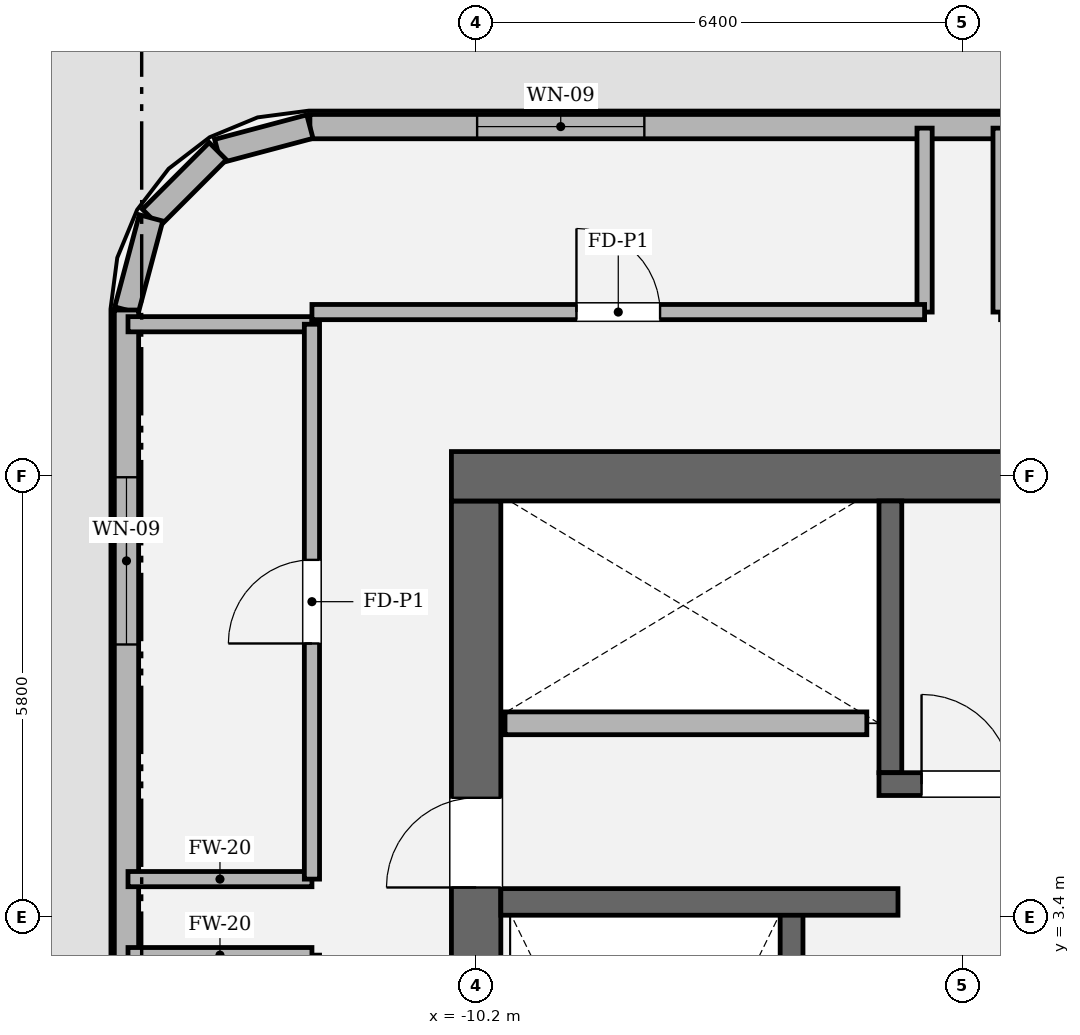
"""IFC4 building model, lengths in metres.
Left out: names, types, materials, properties, quantities, classifications, styles, units other than length and angle.
Written with IfcOpenShell. Run it as: python <this file> out.ifc"""

import sys

from ifc_helpers import new_model, si_unit, direction, frame, frame_2d, origin, place, context, subcontext, project, spatial, rectangle, extrude, element, fill, save


model = new_model("IFC4")
c1 = context("Model", 3, precision=1e-05, world=origin(), true_north=direction((0.0, 1.0)))
c2 = subcontext(c1, "Body", "Model", "MODEL_VIEW")
j1 = project(units=[si_unit("LENGTHUNIT", "METRE"), si_unit("PLANEANGLEUNIT", "RADIAN")], contexts=[c1])
p1 = place(None, origin())
s1 = spatial("IfcSite", under=j1, at=p1, CompositionType="ELEMENT")
p2 = place(p1, origin())
s2 = spatial("IfcBuilding", under=s1, at=p2, CompositionType="ELEMENT")
p3 = place(p2, frame((0.0, 0.0, 125.4)))
s3 = spatial("IfcBuildingStorey", under=s2, at=p3, CompositionType="ELEMENT", Elevation=125.4)
p4 = place(p3, frame((-10.2, -8.875, 0.0), z_axis=(0.0, 0.0, 1.0), x_axis=(0.0, 1.0, 0.0)))
e1 = element("IfcWall", 1, at=p4, inside=s3, PredefinedType="SHEAR", context=c2, shape_type="SweptSolid", body=[
    extrude(rectangle(XDim=17.75, YDim=0.65, at=frame_2d((8.875, 0.0))), origin(), (0.0, 0.0, 1.0), 4.8),
])
p5 = place(p4, frame((12.665, 0.0, 0.0)))
e2 = element("IfcOpeningElement", 2, at=p5, cuts=e1, PredefinedType="OPENING", context=c2, shape_type="SweptSolid", body=[
    extrude(rectangle(XDim=1.18, YDim=2.2, at=frame_2d((0.59, 1.1))), frame((0.0, 0.335, 0.0), z_axis=(0.0, -1.0, 0.0), x_axis=(1.0, 0.0, 0.0)), (0.0, 0.0, 1.0), 0.67),
])
p6 = place(p3, frame((-10.525, 9.2, 0.0), z_axis=(0.0, 0.0, 1.0), x_axis=(1.0, 0.0, 0.0)))
e3 = element("IfcWall", 3, at=p6, inside=s3, PredefinedType="SHEAR", context=c2, shape_type="SweptSolid", body=[
    extrude(rectangle(XDim=21.05, YDim=0.65, at=frame_2d((10.525, 0.0))), origin(), (0.0, 0.0, 1.0), 4.8),
])
p7 = place(p3, frame((-6.05, -5.5, 0.0), z_axis=(0.0, 0.0, 1.0), x_axis=(0.0, 1.0, 0.0)))
e4 = element("IfcWall", 4, at=p7, inside=s3, PredefinedType="SOLIDWALL", context=c2, shape_type="SweptSolid", body=[
    extrude(rectangle(XDim=8.95, YDim=0.3, at=frame_2d((4.475, 0.0))), origin(), (0.0, 0.0, 1.0), 4.8),
])
p8 = place(p3, frame((-4.75, 5.3, 0.0), z_axis=(0.0, 0.0, 1.0), x_axis=(0.0, 1.0, 0.0)))
e5 = element("IfcWall", 5, at=p8, inside=s3, PredefinedType="SOLIDWALL", context=c2, shape_type="SweptSolid", body=[
    extrude(rectangle(XDim=3.575, YDim=0.3, at=frame_2d((1.788, 0.0))), origin(), (0.0, 0.0, 1.0), 4.8),
])
p9 = place(p3, frame((-4.9, 5.15, 0.0), z_axis=(0.0, 0.0, 1.0), x_axis=(1.0, 0.0, 0.0)))
e6 = element("IfcWall", 6, at=p9, inside=s3, PredefinedType="SOLIDWALL", context=c2, shape_type="SweptSolid", body=[
    extrude(rectangle(XDim=9.8, YDim=0.3, at=frame_2d((4.9, 0.0))), origin(), (0.0, 0.0, 1.0), 4.8),
])
p10 = place(p9, frame((0.56, 0.0, 0.0)))
e7 = element("IfcOpeningElement", 7, at=p10, cuts=e6, PredefinedType="OPENING", context=c2, shape_type="SweptSolid", body=[
    extrude(rectangle(XDim=1.18, YDim=2.2, at=frame_2d((0.59, 1.1))), frame((0.0, 0.16, 0.0), z_axis=(0.0, -1.0, 0.0), x_axis=(1.0, 0.0, 0.0)), (0.0, 0.0, 1.0), 0.32),
])
p11 = place(p3, frame((-9.875, 3.6, 0.0), z_axis=(0.0, 0.0, 1.0), x_axis=(1.0, 0.0, 0.0)))
e8 = element("IfcWall", 8, at=p11, inside=s3, PredefinedType="SOLIDWALL", context=c2, shape_type="SweptSolid", body=[
    extrude(rectangle(XDim=5.225, YDim=0.35, at=frame_2d((2.613, 0.0))), origin(), (0.0, 0.0, 1.0), 4.8),
])
p12 = place(p3, frame((12.387, 13.8, 0.0), z_axis=(0.0, 0.0, 1.0), x_axis=(-1.0, 0.0, 0.0)))
e9 = element("IfcWall", 9, at=p12, inside=s3, PredefinedType="SOLIDWALL", context=c2, shape_type="SweptSolid", body=[
    extrude(rectangle(XDim=24.774, YDim=0.32, at=frame_2d((12.387, 0.0))), origin(), (0.0, 0.0, 1.0), 3.194),
])
p13 = place(p12, frame((2.2, 0.0, 0.9)))
e10 = element("IfcOpeningElement", 10, at=p13, cuts=e9, PredefinedType="OPENING", context=c2, shape_type="SweptSolid", body=[
    extrude(rectangle(XDim=2.2, YDim=1.2, at=frame_2d((1.1, 0.6))), frame((0.0, 0.17, 0.0), z_axis=(0.0, -1.0, 0.0), x_axis=(1.0, 0.0, 0.0)), (0.0, 0.0, 1.0), 0.34),
])
p14 = place(p12, frame((20.374, 0.0, 0.9)))
e11 = element("IfcOpeningElement", 11, at=p14, cuts=e9, PredefinedType="OPENING", context=c2, shape_type="SweptSolid", body=[
    extrude(rectangle(XDim=2.2, YDim=1.2, at=frame_2d((1.1, 0.6))), frame((0.0, 0.17, 0.0), z_axis=(0.0, -1.0, 0.0), x_axis=(1.0, 0.0, 0.0)), (0.0, 0.0, 1.0), 0.34),
])
p15 = place(p3, frame((-12.387, 13.8, 0.0), z_axis=(0.0, 0.0, 1.0), x_axis=(-0.966283375382, -0.25748094776, 0.0)))
e12 = element("IfcWall", 12, at=p15, inside=s3, PredefinedType="SOLIDWALL", context=c2, shape_type="SweptSolid", body=[
    extrude(rectangle(XDim=1.254, YDim=0.32, at=frame_2d((0.627, 0.0))), origin(), (0.0, 0.0, 1.0), 3.194),
])
p16 = place(p3, frame((-13.599, 13.477, 0.0), z_axis=(0.0, 0.0, 1.0), x_axis=(-0.707106781187, -0.707106781187, 0.0)))
e13 = element("IfcWall", 13, at=p16, inside=s3, PredefinedType="SOLIDWALL", context=c2, shape_type="SweptSolid", body=[
    extrude(rectangle(XDim=1.242, YDim=0.32, at=frame_2d((0.621, 0.0))), origin(), (0.0, 0.0, 1.0), 3.194),
])
p17 = place(p3, frame((-14.477, 12.599, 0.0), z_axis=(0.0, 0.0, 1.0), x_axis=(-0.25748094776, -0.966283375382, 0.0)))
e14 = element("IfcWall", 14, at=p17, inside=s3, PredefinedType="SOLIDWALL", context=c2, shape_type="SweptSolid", body=[
    extrude(rectangle(XDim=1.254, YDim=0.32, at=frame_2d((0.627, 0.0))), origin(), (0.0, 0.0, 1.0), 3.194),
])
p18 = place(p3, frame((-14.8, 11.387, 0.0), z_axis=(0.0, 0.0, 1.0), x_axis=(0.0, -1.0, 0.0)))
e15 = element("IfcWall", 15, at=p18, inside=s3, PredefinedType="SOLIDWALL", context=c2, shape_type="SweptSolid", body=[
    extrude(rectangle(XDim=22.774, YDim=0.32, at=frame_2d((11.387, 0.0))), origin(), (0.0, 0.0, 1.0), 3.194),
])
p19 = place(p18, frame((2.2, 0.0, 0.9)))
e16 = element("IfcOpeningElement", 16, at=p19, cuts=e15, PredefinedType="OPENING", context=c2, shape_type="SweptSolid", body=[
    extrude(rectangle(XDim=2.2, YDim=1.2, at=frame_2d((1.1, 0.6))), frame((0.0, 0.17, 0.0), z_axis=(0.0, -1.0, 0.0), x_axis=(1.0, 0.0, 0.0)), (0.0, 0.0, 1.0), 0.34),
])
p20 = place(p18, frame((18.374, 0.0, 0.9)))
e17 = element("IfcOpeningElement", 17, at=p20, cuts=e15, PredefinedType="OPENING", context=c2, shape_type="SweptSolid", body=[
    extrude(rectangle(XDim=2.2, YDim=1.2, at=frame_2d((1.1, 0.6))), frame((0.0, 0.17, 0.0), z_axis=(0.0, -1.0, 0.0), x_axis=(1.0, 0.0, 0.0)), (0.0, 0.0, 1.0), 0.34),
])
p21 = place(p3, frame((-9.82, 5.95, 0.0), z_axis=(0.0, 0.0, 1.0), x_axis=(1.0, 0.0, 0.0)))
e18 = element("IfcWall", 18, at=p21, inside=s3, PredefinedType="SOLIDWALL", context=c2, shape_type="SweptSolid", body=[
    extrude(rectangle(XDim=4.76, YDim=0.3, at=frame_2d((2.38, 0.0))), origin(), (0.0, 0.0, 1.0), 4.48),
])
for number, where, z_axis, x_axis in (
    (19, (-14.78, 2.9, 0.0), (0.0, 0.0, 1.0), (1.0, 0.0, 0.0)),
    (20, (-12.36, 3.9, 0.0), (0.0, 0.0, 1.0), (-1.0, 0.0, 0.0)),
    (21, (-14.78, 11.2, 0.0), (0.0, 0.0, 1.0), (1.0, 0.0, 0.0)),
):
    element("IfcWall", number, at=place(p3, frame(where, z_axis=z_axis, x_axis=x_axis)), inside=s3, PredefinedType="SOLIDWALL", context=c2, shape_type="SweptSolid", body=[
        extrude(rectangle(XDim=2.42, YDim=0.2, at=frame_2d((1.21, 0.0))), origin(), (0.0, 0.0, 1.0), 3.194),
    ])
p22 = place(p3, frame((-12.36, 11.2, 0.0), z_axis=(0.0, 0.0, 1.0), x_axis=(0.0, -1.0, 0.0)))
e22 = element("IfcWall", 22, at=p22, inside=s3, PredefinedType="SOLIDWALL", context=c2, shape_type="SweptSolid", body=[
    extrude(rectangle(XDim=7.3, YDim=0.2, at=frame_2d((3.65, 0.0))), origin(), (0.0, 0.0, 1.0), 4.48),
])
p23 = place(p22, frame((3.1, 0.0, 0.0)))
e23 = element("IfcOpeningElement", 23, at=p23, cuts=e22, PredefinedType="OPENING", context=c2, shape_type="SweptSolid", body=[
    extrude(rectangle(XDim=1.1, YDim=2.2, at=frame_2d((0.55, 1.1))), frame((0.0, 0.11, 0.0), z_axis=(0.0, -1.0, 0.0), x_axis=(1.0, 0.0, 0.0)), (0.0, 0.0, 1.0), 0.22),
])
p24 = place(p3, frame((-4.3, 13.78, 0.0), z_axis=(0.0, 0.0, 1.0), x_axis=(0.0, -1.0, 0.0)))
e24 = element("IfcWall", 24, at=p24, inside=s3, PredefinedType="SOLIDWALL", context=c2, shape_type="SweptSolid", body=[
    extrude(rectangle(XDim=2.42, YDim=0.2, at=frame_2d((1.21, 0.0))), origin(), (0.0, 0.0, 1.0), 3.194),
])
p25 = place(p3, frame((-4.3, 11.36, 0.0), z_axis=(0.0, 0.0, 1.0), x_axis=(-1.0, 0.0, 0.0)))
e25 = element("IfcWall", 25, at=p25, inside=s3, PredefinedType="SOLIDWALL", context=c2, shape_type="SweptSolid", body=[
    extrude(rectangle(XDim=8.06, YDim=0.2, at=frame_2d((4.03, 0.0))), origin(), (0.0, 0.0, 1.0), 4.48),
])
p26 = place(p25, frame((3.48, 0.0, 0.0)))
e26 = element("IfcOpeningElement", 26, at=p26, cuts=e25, PredefinedType="OPENING", context=c2, shape_type="SweptSolid", body=[
    extrude(rectangle(XDim=1.1, YDim=2.2, at=frame_2d((0.55, 1.1))), frame((0.0, 0.11, 0.0), z_axis=(0.0, -1.0, 0.0), x_axis=(1.0, 0.0, 0.0)), (0.0, 0.0, 1.0), 0.22),
])
p27 = place(p3, frame((-3.3, 11.36, 0.0), z_axis=(0.0, 0.0, 1.0), x_axis=(0.0, 1.0, 0.0)))
e27 = element("IfcWall", 27, at=p27, inside=s3, PredefinedType="SOLIDWALL", context=c2, shape_type="SweptSolid", body=[
    extrude(rectangle(XDim=2.42, YDim=0.2, at=frame_2d((1.21, 0.0))), origin(), (0.0, 0.0, 1.0), 3.194),
])
p28 = place(p14, origin())
e28 = element("IfcWindow", 28, at=p28, inside=s3, PartitioningType="SINGLE_PANEL", PredefinedType="WINDOW", context=c2, shape_type="SweptSolid", body=[
    extrude(rectangle(XDim=2.2, YDim=1.2, at=frame_2d((1.1, 0.6))), frame((0.0, 0.03, 0.0), z_axis=(0.0, -1.0, 0.0), x_axis=(1.0, 0.0, 0.0)), (0.0, 0.0, 1.0), 0.06),
])
fill(e11, e28)
p29 = place(p19, origin())
e29 = element("IfcWindow", 29, at=p29, inside=s3, PartitioningType="SINGLE_PANEL", PredefinedType="WINDOW", context=c2, shape_type="SweptSolid", body=[
    extrude(rectangle(XDim=2.2, YDim=1.2, at=frame_2d((1.1, 0.6))), frame((0.0, 0.03, 0.0), z_axis=(0.0, -1.0, 0.0), x_axis=(1.0, 0.0, 0.0)), (0.0, 0.0, 1.0), 0.06),
])
fill(e16, e29)
p30 = place(p10, origin())
e30 = element("IfcDoor", 30, at=p30, inside=s3, OperationType="SINGLE_SWING_LEFT", PredefinedType="DOOR", context=c2, shape_type="SweptSolid", body=[
    extrude(rectangle(XDim=1.18, YDim=2.2, at=frame_2d((0.59, 1.1))), frame((0.0, 0.025, 0.0), z_axis=(0.0, -1.0, 0.0), x_axis=(1.0, 0.0, 0.0)), (0.0, 0.0, 1.0), 0.05),
])
fill(e7, e30)
p31 = place(p5, origin())
e31 = element("IfcDoor", 31, at=p31, inside=s3, OperationType="SINGLE_SWING_LEFT", PredefinedType="DOOR", context=c2, shape_type="SweptSolid", body=[
    extrude(rectangle(XDim=1.18, YDim=2.2, at=frame_2d((0.59, 1.1))), frame((0.0, 0.025, 0.0), z_axis=(0.0, -1.0, 0.0), x_axis=(1.0, 0.0, 0.0)), (0.0, 0.0, 1.0), 0.05),
])
fill(e2, e31)
p32 = place(p23, origin())
e32 = element("IfcDoor", 32, at=p32, inside=s3, OperationType="SINGLE_SWING_RIGHT", PredefinedType="DOOR", context=c2, shape_type="SweptSolid", body=[
    extrude(rectangle(XDim=1.1, YDim=2.2, at=frame_2d((0.55, 1.1))), frame((0.0, 0.025, 0.0), z_axis=(0.0, -1.0, 0.0), x_axis=(1.0, 0.0, 0.0)), (0.0, 0.0, 1.0), 0.05),
])
fill(e23, e32)
p33 = place(p26, origin())
e33 = element("IfcDoor", 33, at=p33, inside=s3, OperationType="SINGLE_SWING_RIGHT", PredefinedType="DOOR", context=c2, shape_type="SweptSolid", body=[
    extrude(rectangle(XDim=1.1, YDim=2.2, at=frame_2d((0.55, 1.1))), frame((0.0, 0.025, 0.0), z_axis=(0.0, -1.0, 0.0), x_axis=(1.0, 0.0, 0.0)), (0.0, 0.0, 1.0), 0.05),
])
fill(e26, e33)
save(model, sys.argv[1])
